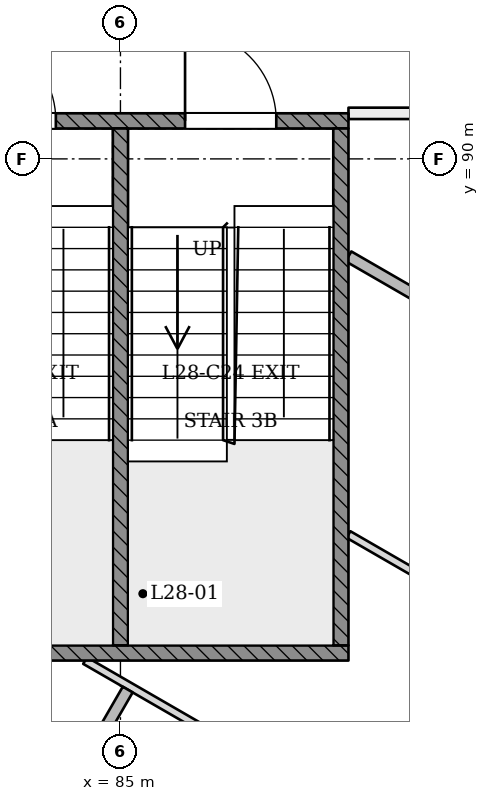
"""IFC4 building model, lengths in metres.
Left out: names, types, materials, properties, quantities, classifications, styles, units other than length and angle.
Written with IfcOpenShell. Run it as: python <this file> out.ifc"""

import sys

from ifc_helpers import new_model, si_unit, direction, frame, frame_2d, origin, place, context, subcontext, project, spatial, rectangle, extrude, element, fill, save


model = new_model("IFC4")
c1 = context("Model", 3, precision=1e-05, world=origin(), true_north=direction((0.0, 1.0)))
c2 = subcontext(c1, "Body", "Model", "MODEL_VIEW")
j1 = project(units=[si_unit("LENGTHUNIT", "METRE"), si_unit("PLANEANGLEUNIT", "RADIAN")], contexts=[c1])
p1 = place(None, origin())
s1 = spatial("IfcSite", under=j1, at=p1, CompositionType="ELEMENT")
p2 = place(p1, origin())
s2 = spatial("IfcBuilding", under=s1, at=p2, CompositionType="ELEMENT")
p3 = place(p2, frame((0.0, 0.0, 111.6)))
s3 = spatial("IfcBuildingStorey", under=s2, at=p3, CompositionType="ELEMENT", Elevation=111.6)
p4 = place(p3, frame((88.0, 90.599, 0.0), z_axis=(0.0, 0.0, 1.0), x_axis=(0.999999996448, 8.429038e-05, 0.0)))
e1 = element("IfcWall", 1, at=p4, inside=s3, PredefinedType="PARTITIONING", context=c2, shape_type="SweptSolid", body=[
    extrude(rectangle(XDim=11.586, YDim=0.15, at=frame_2d((5.793, 0.0))), origin(), (0.0, 0.0, 1.0), 3.1),
])
p5 = place(p4, frame((2.465, 0.0, 0.0)))
e2 = element("IfcOpeningElement", 2, at=p5, cuts=e1, PredefinedType="OPENING", context=c2, shape_type="SweptSolid", body=[
    extrude(rectangle(XDim=1.0, YDim=2.1, at=frame_2d((0.5, 1.05))), frame((0.0, 0.085, 0.0), z_axis=(0.0, -1.0, 0.0), x_axis=(1.0, 0.0, 0.0)), (0.0, 0.0, 1.0), 0.171),
])
p6 = place(p3, frame((99.716, 90.6, 0.0), z_axis=(0.0, 0.0, 1.0), x_axis=(-0.500001331159, -0.866024635238, 0.0)))
e3 = element("IfcWall", 3, at=p6, inside=s3, PredefinedType="PARTITIONING", context=c2, shape_type="SweptSolid", body=[
    extrude(rectangle(XDim=29.302, YDim=0.15, at=frame_2d((14.651, 0.0))), origin(), (0.0, 0.0, 1.0), 3.1),
])
p7 = place(p6, frame((2.192, 0.0, 0.0)))
e4 = element("IfcOpeningElement", 4, at=p7, cuts=e3, PredefinedType="OPENING", context=c2, shape_type="SweptSolid", body=[
    extrude(rectangle(XDim=0.9, YDim=2.1, at=frame_2d((0.45, 1.05))), frame((0.0, 0.085, 0.0), z_axis=(0.0, -1.0, 0.0), x_axis=(1.0, 0.0, 0.0)), (0.0, 0.0, 1.0), 0.171),
])
p8 = place(p6, frame((5.182, 0.0, 0.0)))
e5 = element("IfcOpeningElement", 5, at=p8, cuts=e3, PredefinedType="OPENING", context=c2, shape_type="SweptSolid", body=[
    extrude(rectangle(XDim=0.9, YDim=2.1, at=frame_2d((0.45, 1.05))), frame((0.0, 0.085, 0.0), z_axis=(0.0, -1.0, 0.0), x_axis=(1.0, 0.0, 0.0)), (0.0, 0.0, 1.0), 0.171),
])
p9 = place(p6, frame((15.001, 0.0, 0.0)))
e6 = element("IfcOpeningElement", 6, at=p9, cuts=e3, PredefinedType="OPENING", context=c2, shape_type="SweptSolid", body=[
    extrude(rectangle(XDim=1.0, YDim=2.1, at=frame_2d((0.5, 1.05))), frame((0.0, 0.085, 0.0), z_axis=(0.0, -1.0, 0.0), x_axis=(1.0, 0.0, 0.0)), (0.0, 0.0, 1.0), 0.171),
])
p10 = place(p6, frame((18.236, 0.0, 0.0)))
e7 = element("IfcOpeningElement", 7, at=p10, cuts=e3, PredefinedType="OPENING", context=c2, shape_type="SweptSolid", body=[
    extrude(rectangle(XDim=1.0, YDim=2.1, at=frame_2d((0.5, 1.05))), frame((0.0, 0.085, 0.0), z_axis=(0.0, -1.0, 0.0), x_axis=(1.0, 0.0, 0.0)), (0.0, 0.0, 1.0), 0.171),
])
p11 = place(p6, frame((8.514, 0.0, 0.0)))
e8 = element("IfcOpeningElement", 8, at=p11, cuts=e3, PredefinedType="OPENING", context=c2, shape_type="SweptSolid", body=[
    extrude(rectangle(XDim=1.0, YDim=2.1, at=frame_2d((0.5, 1.05))), frame((0.0, 0.085, 0.0), z_axis=(0.0, -1.0, 0.0), x_axis=(1.0, 0.0, 0.0)), (0.0, 0.0, 1.0), 0.171),
])
p12 = place(p6, frame((11.823, 0.0, 0.0)))
e9 = element("IfcOpeningElement", 9, at=p12, cuts=e3, PredefinedType="OPENING", context=c2, shape_type="SweptSolid", body=[
    extrude(rectangle(XDim=1.0, YDim=2.1, at=frame_2d((0.5, 1.05))), frame((0.0, 0.085, 0.0), z_axis=(0.0, -1.0, 0.0), x_axis=(1.0, 0.0, 0.0)), (0.0, 0.0, 1.0), 0.171),
])
p13 = place(p6, frame((22.054, 0.0, 0.0)))
e10 = element("IfcOpeningElement", 10, at=p13, cuts=e3, PredefinedType="OPENING", context=c2, shape_type="SweptSolid", body=[
    extrude(rectangle(XDim=1.0, YDim=2.1, at=frame_2d((0.5, 1.05))), frame((0.0, 0.085, 0.0), z_axis=(0.0, -1.0, 0.0), x_axis=(1.0, 0.0, 0.0)), (0.0, 0.0, 1.0), 0.171),
])
p14 = place(p3, frame((85.0, 65.112, 0.0), z_axis=(0.0, 0.0, 1.0), x_axis=(-0.499994117932, 0.866028799771, 0.0)))
e11 = element("IfcWall", 11, at=p14, inside=s3, PredefinedType="PARTITIONING", context=c2, shape_type="SweptSolid", body=[
    extrude(rectangle(XDim=29.431, YDim=0.15, at=frame_2d((14.716, 0.0))), origin(), (0.0, 0.0, 1.0), 3.1),
])
p15 = place(p14, frame((2.874, 0.0, 0.0)))
e12 = element("IfcOpeningElement", 12, at=p15, cuts=e11, PredefinedType="OPENING", context=c2, shape_type="SweptSolid", body=[
    extrude(rectangle(XDim=1.0, YDim=2.1, at=frame_2d((0.5, 1.05))), frame((0.0, 0.085, 0.0), z_axis=(0.0, -1.0, 0.0), x_axis=(1.0, 0.0, 0.0)), (0.0, 0.0, 1.0), 0.171),
])
p16 = place(p14, frame((25.015, 0.0, 0.0)))
e13 = element("IfcOpeningElement", 13, at=p16, cuts=e11, PredefinedType="OPENING", context=c2, shape_type="SweptSolid", body=[
    extrude(rectangle(XDim=1.0, YDim=2.1, at=frame_2d((0.5, 1.05))), frame((0.0, 0.085, 0.0), z_axis=(0.0, -1.0, 0.0), x_axis=(1.0, 0.0, 0.0)), (0.0, 0.0, 1.0), 0.171),
])
p17 = place(p14, frame((12.586, 0.0, 0.0)))
e14 = element("IfcOpeningElement", 14, at=p17, cuts=e11, PredefinedType="OPENING", context=c2, shape_type="SweptSolid", body=[
    extrude(rectangle(XDim=1.0, YDim=2.1, at=frame_2d((0.5, 1.05))), frame((0.0, 0.085, 0.0), z_axis=(0.0, -1.0, 0.0), x_axis=(1.0, 0.0, 0.0)), (0.0, 0.0, 1.0), 0.171),
])
p18 = place(p14, frame((20.422, 0.0, 0.0)))
e15 = element("IfcOpeningElement", 15, at=p18, cuts=e11, PredefinedType="OPENING", context=c2, shape_type="SweptSolid", body=[
    extrude(rectangle(XDim=1.0, YDim=2.1, at=frame_2d((0.5, 1.05))), frame((0.0, 0.085, 0.0), z_axis=(0.0, -1.0, 0.0), x_axis=(1.0, 0.0, 0.0)), (0.0, 0.0, 1.0), 0.171),
])
p19 = place(p14, frame((16.093, 0.0, 0.0)))
e16 = element("IfcOpeningElement", 16, at=p19, cuts=e11, PredefinedType="OPENING", context=c2, shape_type="SweptSolid", body=[
    extrude(rectangle(XDim=1.0, YDim=2.1, at=frame_2d((0.5, 1.05))), frame((0.0, 0.085, 0.0), z_axis=(0.0, -1.0, 0.0), x_axis=(1.0, 0.0, 0.0)), (0.0, 0.0, 1.0), 0.171),
])
p20 = place(p14, frame((8.688, 0.0, 0.0)))
e17 = element("IfcOpeningElement", 17, at=p20, cuts=e11, PredefinedType="OPENING", context=c2, shape_type="SweptSolid", body=[
    extrude(rectangle(XDim=1.2, YDim=2.1, at=frame_2d((0.6, 1.05))), frame((0.0, 0.085, 0.0), z_axis=(0.0, -1.0, 0.0), x_axis=(1.0, 0.0, 0.0)), (0.0, 0.0, 1.0), 0.171),
])
p21 = place(p3, frame((63.988, 97.906, 0.0), z_axis=(0.0, 0.0, 1.0), x_axis=(0.500001579174, -0.866024492046, 0.0)))
e18 = element("IfcWall", 18, at=p21, inside=s3, PredefinedType="PARTITIONING", context=c2, shape_type="SweptSolid", body=[
    extrude(rectangle(XDim=41.339, YDim=0.15, at=frame_2d((20.669, 0.0))), origin(), (0.0, 0.0, 1.0), 2.7),
])
p22 = place(p21, frame((0.228, 0.0, 0.0)))
e19 = element("IfcOpeningElement", 19, at=p22, cuts=e18, PredefinedType="OPENING", context=c2, shape_type="SweptSolid", body=[
    extrude(rectangle(XDim=1.2, YDim=2.1, at=frame_2d((0.6, 1.05))), frame((0.0, 0.085, 0.0), z_axis=(0.0, -1.0, 0.0), x_axis=(1.0, 0.0, 0.0)), (0.0, 0.0, 1.0), 0.171),
])
p23 = place(p21, frame((11.07, 0.0, 0.0)))
e20 = element("IfcOpeningElement", 20, at=p23, cuts=e18, PredefinedType="OPENING", context=c2, shape_type="SweptSolid", body=[
    extrude(rectangle(XDim=1.2, YDim=2.1, at=frame_2d((0.6, 1.05))), frame((0.0, 0.085, 0.0), z_axis=(0.0, -1.0, 0.0), x_axis=(1.0, 0.0, 0.0)), (0.0, 0.0, 1.0), 0.171),
])
p24 = place(p21, frame((22.32, 0.0, 0.0)))
e21 = element("IfcOpeningElement", 21, at=p24, cuts=e18, PredefinedType="OPENING", context=c2, shape_type="SweptSolid", body=[
    extrude(rectangle(XDim=1.2, YDim=2.1, at=frame_2d((0.6, 1.05))), frame((0.0, 0.085, 0.0), z_axis=(0.0, -1.0, 0.0), x_axis=(1.0, 0.0, 0.0)), (0.0, 0.0, 1.0), 0.171),
])
p25 = place(p21, frame((32.47, 0.0, 0.0)))
e22 = element("IfcOpeningElement", 22, at=p25, cuts=e18, PredefinedType="OPENING", context=c2, shape_type="SweptSolid", body=[
    extrude(rectangle(XDim=1.2, YDim=2.1, at=frame_2d((0.6, 1.05))), frame((0.0, 0.085, 0.0), z_axis=(0.0, -1.0, 0.0), x_axis=(1.0, 0.0, 0.0)), (0.0, 0.0, 1.0), 0.171),
])
p26 = place(p21, frame((39.758, 0.0, 0.0)))
e23 = element("IfcOpeningElement", 23, at=p26, cuts=e18, PredefinedType="OPENING", context=c2, shape_type="SweptSolid", body=[
    extrude(rectangle(XDim=1.0, YDim=2.1, at=frame_2d((0.5, 1.05))), frame((0.0, 0.085, 0.0), z_axis=(0.0, -1.0, 0.0), x_axis=(1.0, 0.0, 0.0)), (0.0, 0.0, 1.0), 0.171),
])
p27 = place(p3, frame((85.343, 62.105, 0.0), z_axis=(0.0, 0.0, 1.0), x_axis=(0.500001579174, 0.866024492046, 0.0)))
e24 = element("IfcWall", 24, at=p27, inside=s3, PredefinedType="PARTITIONING", context=c2, shape_type="SweptSolid", body=[
    extrude(rectangle(XDim=41.339, YDim=0.15, at=frame_2d((20.669, 0.0))), origin(), (0.0, 0.0, 1.0), 2.7),
])
p28 = place(p27, frame((0.312, 0.0, 0.0)))
e25 = element("IfcOpeningElement", 25, at=p28, cuts=e24, PredefinedType="OPENING", context=c2, shape_type="SweptSolid", body=[
    extrude(rectangle(XDim=1.2, YDim=2.1, at=frame_2d((0.6, 1.05))), frame((0.0, 0.085, 0.0), z_axis=(0.0, -1.0, 0.0), x_axis=(1.0, 0.0, 0.0)), (0.0, 0.0, 1.0), 0.171),
])
p29 = place(p27, frame((8.82, 0.0, 0.0)))
e26 = element("IfcOpeningElement", 26, at=p29, cuts=e24, PredefinedType="OPENING", context=c2, shape_type="SweptSolid", body=[
    extrude(rectangle(XDim=1.2, YDim=2.1, at=frame_2d((0.6, 1.05))), frame((0.0, 0.085, 0.0), z_axis=(0.0, -1.0, 0.0), x_axis=(1.0, 0.0, 0.0)), (0.0, 0.0, 1.0), 0.171),
])
p30 = place(p27, frame((22.32, 0.0, 0.0)))
e27 = element("IfcOpeningElement", 27, at=p30, cuts=e24, PredefinedType="OPENING", context=c2, shape_type="SweptSolid", body=[
    extrude(rectangle(XDim=1.2, YDim=2.1, at=frame_2d((0.6, 1.05))), frame((0.0, 0.085, 0.0), z_axis=(0.0, -1.0, 0.0), x_axis=(1.0, 0.0, 0.0)), (0.0, 0.0, 1.0), 0.171),
])
p31 = place(p27, frame((32.47, 0.0, 0.0)))
e28 = element("IfcOpeningElement", 28, at=p31, cuts=e24, PredefinedType="OPENING", context=c2, shape_type="SweptSolid", body=[
    extrude(rectangle(XDim=1.2, YDim=2.1, at=frame_2d((0.6, 1.05))), frame((0.0, 0.085, 0.0), z_axis=(0.0, -1.0, 0.0), x_axis=(1.0, 0.0, 0.0)), (0.0, 0.0, 1.0), 0.171),
])
p32 = place(p27, frame((39.739, 0.0, 0.0)))
e29 = element("IfcOpeningElement", 29, at=p32, cuts=e24, PredefinedType="OPENING", context=c2, shape_type="SweptSolid", body=[
    extrude(rectangle(XDim=1.0, YDim=2.1, at=frame_2d((0.5, 1.05))), frame((0.0, 0.085, 0.0), z_axis=(0.0, -1.0, 0.0), x_axis=(1.0, 0.0, 0.0)), (0.0, 0.0, 1.0), 0.171),
])
p33 = place(p3, frame((85.096, 83.019, 0.0), z_axis=(0.0, 0.0, 1.0), x_axis=(-0.499991501415, -0.866030310389, 0.0)))
e30 = element("IfcWall", 30, at=p33, inside=s3, PredefinedType="PARTITIONING", context=c2, shape_type="SweptSolid", body=[
    extrude(rectangle(XDim=6.441, YDim=0.15, at=frame_2d((3.22, 0.0))), origin(), (0.0, 0.0, 1.0), 3.1),
])
p34 = place(p3, frame((92.738, 78.664, 0.0), z_axis=(0.0, 0.0, 1.0), x_axis=(-0.866036218949, 0.499981267118, 0.0)))
e31 = element("IfcWall", 31, at=p34, inside=s3, PredefinedType="PARTITIONING", context=c2, shape_type="SweptSolid", body=[
    extrude(rectangle(XDim=9.472, YDim=0.1, at=frame_2d((4.736, 0.0))), origin(), (0.0, 0.0, 1.0), 3.1),
])
p35 = place(p3, frame((88.0, 85.059, 0.0), z_axis=(0.0, 0.0, 1.0), x_axis=(0.866026309874, -0.499998430604, 0.0)))
e32 = element("IfcWall", 32, at=p35, inside=s3, PredefinedType="PARTITIONING", context=c2, shape_type="SweptSolid", body=[
    extrude(rectangle(XDim=7.3, YDim=0.1, at=frame_2d((3.65, 0.0))), origin(), (0.0, 0.0, 1.0), 3.1),
])
p36 = place(p3, frame((93.169, 85.733, 0.0), z_axis=(0.0, 0.0, 1.0), x_axis=(-0.866019379875, 0.500010433572, 0.0)))
e33 = element("IfcWall", 33, at=p36, inside=s3, PredefinedType="PARTITIONING", context=c2, shape_type="SweptSolid", body=[
    extrude(rectangle(XDim=5.969, YDim=0.15, at=frame_2d((2.984, 0.0))), origin(), (0.0, 0.0, 1.0), 3.1),
])
p37 = place(p3, frame((82.0, 90.5, 0.0), z_axis=(0.0, 0.0, 1.0), x_axis=(1.0, 0.0, 0.0)))
e34 = element("IfcWall", 34, at=p37, inside=s3, PredefinedType="SOLIDWALL", context=c2, shape_type="SweptSolid", body=[
    extrude(rectangle(XDim=6.0, YDim=0.2, at=frame_2d((3.0, 0.0))), origin(), (0.0, 0.0, 1.0), 3.1),
])
p38 = place(p37, frame((0.95, 0.0, 0.0)))
e35 = element("IfcOpeningElement", 35, at=p38, cuts=e34, PredefinedType="OPENING", context=c2, shape_type="SweptSolid", body=[
    extrude(rectangle(XDim=1.2, YDim=2.1, at=frame_2d((0.6, 1.05))), frame((0.0, 0.11, 0.0), z_axis=(0.0, -1.0, 0.0), x_axis=(1.0, 0.0, 0.0)), (0.0, 0.0, 1.0), 0.221),
])
p39 = place(p37, frame((3.85, 0.0, 0.0)))
e36 = element("IfcOpeningElement", 36, at=p39, cuts=e34, PredefinedType="OPENING", context=c2, shape_type="SweptSolid", body=[
    extrude(rectangle(XDim=1.2, YDim=2.1, at=frame_2d((0.6, 1.05))), frame((0.0, 0.11, 0.0), z_axis=(0.0, -1.0, 0.0), x_axis=(1.0, 0.0, 0.0)), (0.0, 0.0, 1.0), 0.221),
])
p40 = place(p3, frame((82.0, 83.5, 0.0), z_axis=(0.0, 0.0, 1.0), x_axis=(1.0, 0.0, 0.0)))
e37 = element("IfcWall", 37, at=p40, inside=s3, PredefinedType="SOLIDWALL", context=c2, shape_type="SweptSolid", body=[
    extrude(rectangle(XDim=6.0, YDim=0.2, at=frame_2d((3.0, 0.0))), origin(), (0.0, 0.0, 1.0), 3.1),
])
for number, where, z_axis, x_axis in (
    (38, (87.9, 83.6, 0.0), (0.0, 0.0, 1.0), (0.0, 1.0, 0.0)),
    (39, (85.0, 83.6, 0.0), (0.0, 0.0, 1.0), (0.0, 1.0, 0.0)),
):
    element("IfcWall", number, at=place(p3, frame(where, z_axis=z_axis, x_axis=x_axis)), inside=s3, PredefinedType="SOLIDWALL", context=c2, shape_type="SweptSolid", body=[
        extrude(rectangle(XDim=6.8, YDim=0.2, at=frame_2d((3.4, 0.0))), origin(), (0.0, 0.0, 1.0), 3.1),
    ])
p41 = place(p38, origin())
e40 = element("IfcDoor", 40, at=p41, inside=s3, OperationType="SINGLE_SWING_LEFT", PredefinedType="NOTDEFINED", context=c2, shape_type="SweptSolid", body=[
    extrude(rectangle(XDim=1.2, YDim=2.1, at=frame_2d((0.6, 1.05))), frame((0.0, 0.025, 0.0), z_axis=(0.0, -1.0, 0.0), x_axis=(1.0, 0.0, 0.0)), (0.0, 0.0, 1.0), 0.05),
])
fill(e35, e40)
p42 = place(p39, origin())
e41 = element("IfcDoor", 41, at=p42, inside=s3, OperationType="SINGLE_SWING_LEFT", PredefinedType="NOTDEFINED", context=c2, shape_type="SweptSolid", body=[
    extrude(rectangle(XDim=1.2, YDim=2.1, at=frame_2d((0.6, 1.05))), frame((0.0, 0.025, 0.0), z_axis=(0.0, -1.0, 0.0), x_axis=(1.0, 0.0, 0.0)), (0.0, 0.0, 1.0), 0.05),
])
fill(e36, e41)
save(model, sys.argv[1])
